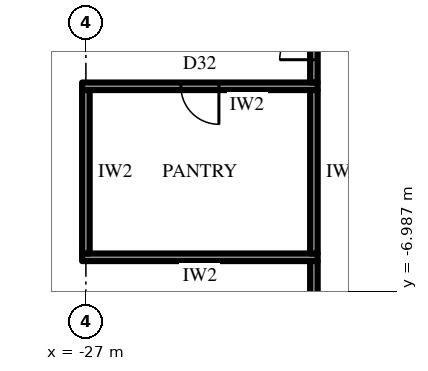
"""IFC4 building model, lengths in metres.
Left out: names, types, materials, properties, quantities, classifications, styles, units other than length and angle.
Written with IfcOpenShell. Run it as: python <this file> out.ifc"""

import sys

from ifc_helpers import new_model, si_unit, direction, frame, frame_2d, origin, place, context, subcontext, project, spatial, rectangle, extrude, element, fill, save


model = new_model("IFC4")
c1 = context("Model", 3, precision=1e-05, world=origin(), true_north=direction((0.0, 1.0)))
c2 = subcontext(c1, "Body", "Model", "MODEL_VIEW")
j1 = project(units=[si_unit("LENGTHUNIT", "METRE"), si_unit("PLANEANGLEUNIT", "RADIAN")], contexts=[c1])
p1 = place(None, origin())
s1 = spatial("IfcSite", under=j1, at=p1, CompositionType="ELEMENT")
p2 = place(p1, origin())
s2 = spatial("IfcBuilding", under=s1, at=p2, CompositionType="ELEMENT")
p3 = place(p2, frame((0.0, 0.0, 52.9)))
s3 = spatial("IfcBuildingStorey", under=s2, at=p3, CompositionType="ELEMENT", Elevation=52.9)
p4 = place(p3, frame((-37.398, -2.925, 0.0), z_axis=(0.0, 0.0, 1.0), x_axis=(0.499999163675, -0.866025886636, 0.0)))
e1 = element("IfcWall", 1, at=p4, inside=s3, PredefinedType="SOLIDWALL", context=c2, shape_type="SweptSolid", body=[
    extrude(rectangle(XDim=32.332, YDim=0.3, at=frame_2d((16.166, 0.0))), origin(), (0.0, 0.0, 1.0), 2.7),
])
p5 = place(p4, frame((1.319, 0.0, 0.6)))
e2 = element("IfcOpeningElement", 2, at=p5, cuts=e1, PredefinedType="OPENING", context=c2, shape_type="SweptSolid", body=[
    extrude(rectangle(XDim=2.75, YDim=1.85, at=frame_2d((1.375, 0.925))), frame((0.0, 0.16, 0.0), z_axis=(0.0, -1.0, 0.0), x_axis=(1.0, 0.0, 0.0)), (0.0, 0.0, 1.0), 0.32),
])
p6 = place(p4, frame((6.708, 0.0, 0.6)))
e3 = element("IfcOpeningElement", 3, at=p6, cuts=e1, PredefinedType="OPENING", context=c2, shape_type="SweptSolid", body=[
    extrude(rectangle(XDim=2.75, YDim=1.85, at=frame_2d((1.375, 0.925))), frame((0.0, 0.16, 0.0), z_axis=(0.0, -1.0, 0.0), x_axis=(1.0, 0.0, 0.0)), (0.0, 0.0, 1.0), 0.32),
])
p7 = place(p4, frame((12.872, 0.0, 0.0)))
e4 = element("IfcOpeningElement", 4, at=p7, cuts=e1, PredefinedType="OPENING", context=c2, shape_type="SweptSolid", body=[
    extrude(rectangle(XDim=1.2, YDim=2.4, at=frame_2d((0.6, 1.2))), frame((0.0, 0.16, 0.0), z_axis=(0.0, -1.0, 0.0), x_axis=(1.0, 0.0, 0.0)), (0.0, 0.0, 1.0), 0.32),
])
p8 = place(p4, frame((17.485, 0.0, 0.6)))
e5 = element("IfcOpeningElement", 5, at=p8, cuts=e1, PredefinedType="OPENING", context=c2, shape_type="SweptSolid", body=[
    extrude(rectangle(XDim=2.75, YDim=1.85, at=frame_2d((1.375, 0.925))), frame((0.0, 0.16, 0.0), z_axis=(0.0, -1.0, 0.0), x_axis=(1.0, 0.0, 0.0)), (0.0, 0.0, 1.0), 0.32),
])
p9 = place(p4, frame((22.874, 0.0, 0.6)))
e6 = element("IfcOpeningElement", 6, at=p9, cuts=e1, PredefinedType="OPENING", context=c2, shape_type="SweptSolid", body=[
    extrude(rectangle(XDim=2.75, YDim=1.85, at=frame_2d((1.375, 0.925))), frame((0.0, 0.16, 0.0), z_axis=(0.0, -1.0, 0.0), x_axis=(1.0, 0.0, 0.0)), (0.0, 0.0, 1.0), 0.32),
])
p10 = place(p4, frame((28.262, 0.0, 0.6)))
e7 = element("IfcOpeningElement", 7, at=p10, cuts=e1, PredefinedType="OPENING", context=c2, shape_type="SweptSolid", body=[
    extrude(rectangle(XDim=2.75, YDim=1.85, at=frame_2d((1.375, 0.925))), frame((0.0, 0.16, 0.0), z_axis=(0.0, -1.0, 0.0), x_axis=(1.0, 0.0, 0.0)), (0.0, 0.0, 1.0), 0.32),
])
p11 = place(p3, frame((-20.9, -1.6, 0.0), z_axis=(0.0, 0.0, 1.0), x_axis=(-1.0, 0.0, 0.0)))
e8 = element("IfcWall", 8, at=p11, inside=s3, PredefinedType="PARTITIONING", context=c2, shape_type="SweptSolid", body=[
    extrude(rectangle(XDim=6.2, YDim=0.2, at=frame_2d((3.1, 0.0))), origin(), (0.0, 0.0, 1.0), 4.0),
])
p12 = place(p11, frame((2.6, 0.0, 0.0)))
e9 = element("IfcOpeningElement", 9, at=p12, cuts=e8, PredefinedType="OPENING", context=c2, shape_type="SweptSolid", body=[
    extrude(rectangle(XDim=1.0, YDim=2.2, at=frame_2d((0.5, 1.1))), frame((0.0, 0.11, 0.0), z_axis=(0.0, -1.0, 0.0), x_axis=(1.0, 0.0, 0.0)), (0.0, 0.0, 1.0), 0.22),
])
p13 = place(p3, frame((-20.9, -6.1, 0.0), z_axis=(0.0, 0.0, 1.0), x_axis=(-1.0, 0.0, 0.0)))
e10 = element("IfcWall", 10, at=p13, inside=s3, PredefinedType="PARTITIONING", context=c2, shape_type="SweptSolid", body=[
    extrude(rectangle(XDim=6.2, YDim=0.2, at=frame_2d((3.1, 0.0))), origin(), (0.0, 0.0, 1.0), 4.0),
])
for number, where, z_axis, x_axis in (
    (11, (-21.0, -1.7, 0.0), (0.0, 0.0, 1.0), (0.0, -1.0, 0.0)),
    (12, (-27.0, -1.7, 0.0), (0.0, 0.0, 1.0), (0.0, -1.0, 0.0)),
):
    element("IfcWall", number, at=place(p3, frame(where, z_axis=z_axis, x_axis=x_axis)), inside=s3, PredefinedType="PARTITIONING", context=c2, shape_type="SweptSolid", body=[
        extrude(rectangle(XDim=4.3, YDim=0.2, at=frame_2d((2.15, 0.0))), origin(), (0.0, 0.0, 1.0), 4.0),
    ])
p14 = place(p3, frame((-21.0, -13.1, 0.0), z_axis=(0.0, 0.0, 1.0), x_axis=(0.0, 1.0, 0.0)))
e13 = element("IfcWall", 13, at=p14, inside=s3, PredefinedType="PARTITIONING", context=c2, shape_type="SweptSolid", body=[
    extrude(rectangle(XDim=6.899, YDim=0.2, at=frame_2d((3.45, 0.0))), origin(), (0.0, 0.0, 1.0), 4.0),
])
p15 = place(p3, frame((-21.0, -1.499, 0.0), z_axis=(0.0, 0.0, 1.0), x_axis=(0.0, 1.0, 0.0)))
e14 = element("IfcWall", 14, at=p15, inside=s3, PredefinedType="PARTITIONING", context=c2, shape_type="SweptSolid", body=[
    extrude(rectangle(XDim=14.599, YDim=0.2, at=frame_2d((7.3, 0.0))), origin(), (0.0, 0.0, 1.0), 4.0),
])
p16 = place(p15, frame((0.599, 0.0, 0.0)))
e15 = element("IfcOpeningElement", 15, at=p16, cuts=e14, PredefinedType="OPENING", context=c2, shape_type="SweptSolid", body=[
    extrude(rectangle(XDim=1.8, YDim=2.4, at=frame_2d((0.9, 1.2))), frame((0.0, 0.11, 0.0), z_axis=(0.0, -1.0, 0.0), x_axis=(1.0, 0.0, 0.0)), (0.0, 0.0, 1.0), 0.22),
])
p17 = place(p12, origin())
e16 = element("IfcDoor", 16, at=p17, inside=s3, OperationType="SINGLE_SWING_RIGHT", PredefinedType="DOOR", context=c2, shape_type="SweptSolid", body=[
    extrude(rectangle(XDim=1.0, YDim=2.2, at=frame_2d((0.5, 1.1))), frame((0.0, 0.025, 0.0), z_axis=(0.0, -1.0, 0.0), x_axis=(1.0, 0.0, 0.0)), (0.0, 0.0, 1.0), 0.05),
])
fill(e9, e16)
p18 = place(p16, origin())
e17 = element("IfcDoor", 17, at=p18, inside=s3, OperationType="DOUBLE_DOOR_SINGLE_SWING", PredefinedType="DOOR", context=c2, shape_type="SweptSolid", body=[
    extrude(rectangle(XDim=1.8, YDim=2.4, at=frame_2d((0.9, 1.2))), frame((0.0, 0.025, 0.0), z_axis=(0.0, -1.0, 0.0), x_axis=(1.0, 0.0, 0.0)), (0.0, 0.0, 1.0), 0.05),
])
fill(e15, e17)
save(model, sys.argv[1])
